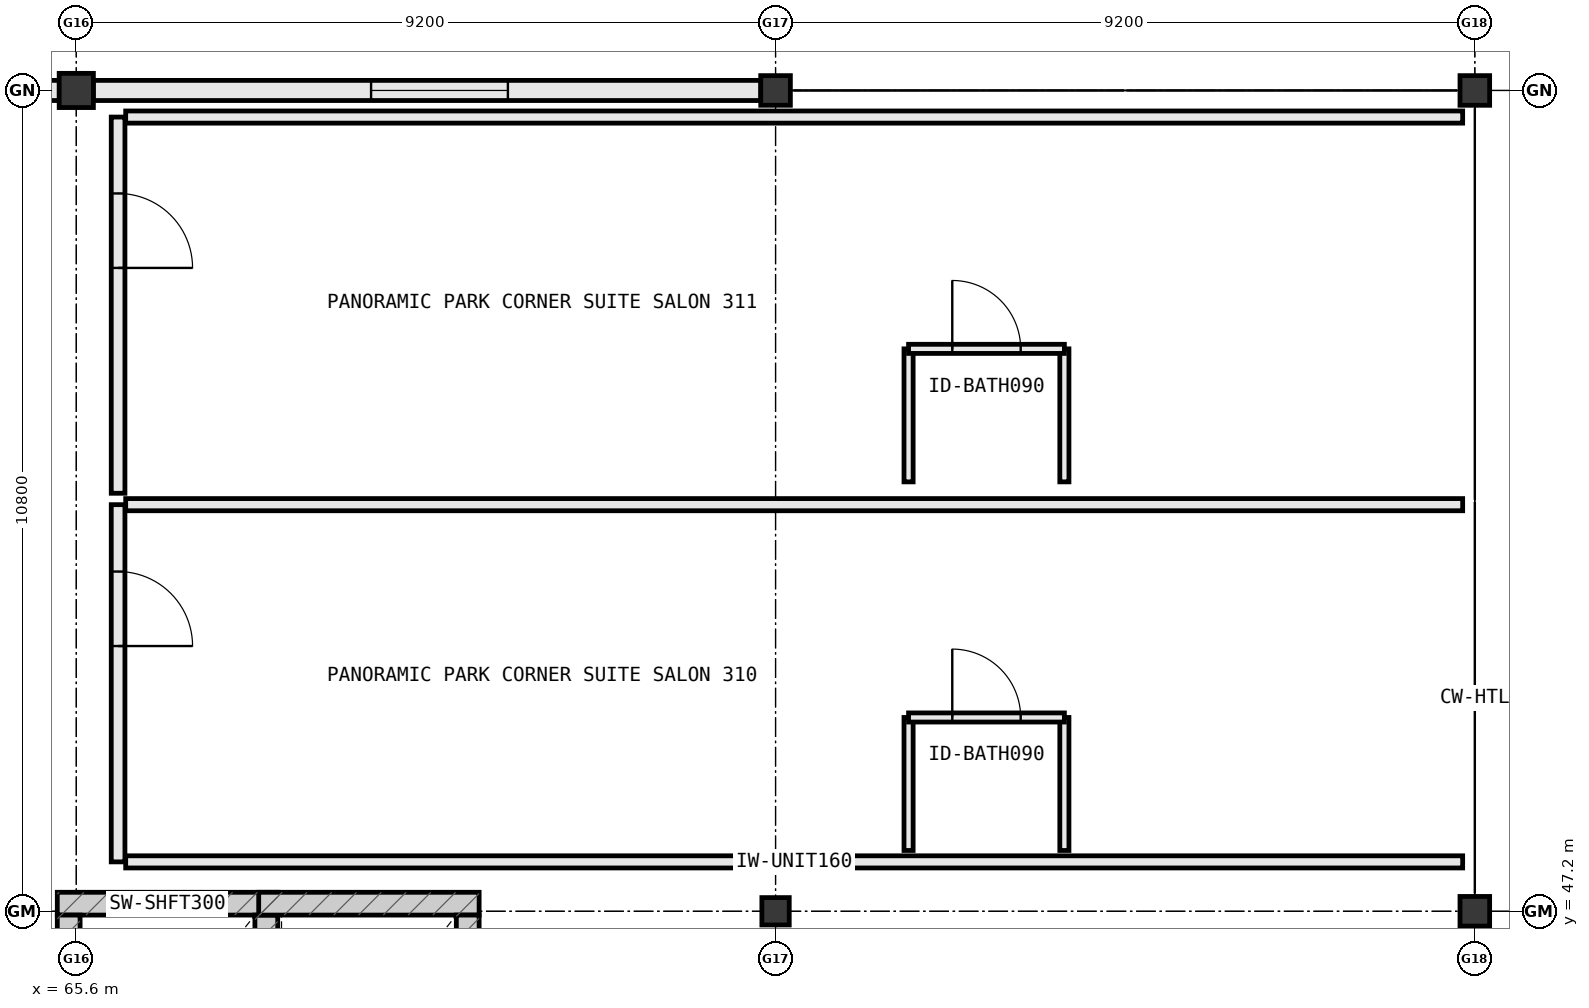
"""IFC4 building model, lengths in metres.
Left out: names, types, materials, properties, quantities, classifications, styles, units other than length and angle.
Written with IfcOpenShell. Run it as: python <this file> out.ifc"""

import sys

from ifc_helpers import new_model, si_unit, direction, frame, frame_2d, origin, origin_2d, place, context, subcontext, project, spatial, rectangle, extrude, element, fill, save


model = new_model("IFC4")
c1 = context("Model", 3, precision=1e-05, world=origin(), true_north=direction((0.0, 1.0)))
c2 = subcontext(c1, "Body", "Model", "MODEL_VIEW")
j1 = project(units=[si_unit("LENGTHUNIT", "METRE"), si_unit("PLANEANGLEUNIT", "RADIAN")], contexts=[c1])
p1 = place(None, origin())
s1 = spatial("IfcSite", under=j1, at=p1, CompositionType="ELEMENT")
p2 = place(p1, origin())
s2 = spatial("IfcBuilding", under=s1, at=p2, CompositionType="ELEMENT")
p3 = place(p2, frame((0.0, 0.0, 46.6)))
s3 = spatial("IfcBuildingStorey", under=s2, at=p3, CompositionType="ELEMENT", Elevation=46.6)
p4 = place(p3, frame((74.8, 47.2, 0.0), z_axis=(0.0, 0.0, 1.0), x_axis=(1.0, 0.0, 0.0)))
e1 = element("IfcColumn", 1, at=p4, inside=s3, PredefinedType="COLUMN", context=c2, shape_type="SweptSolid", body=[
    extrude(rectangle(XDim=0.36, YDim=0.36, at=origin_2d()), origin(), (0.0, 0.0, 1.0), 4.2),
])
for number, where, z_axis, x_axis in (
    (2, (74.8, 58.0, 0.0), (0.0, 0.0, 1.0), (1.0, 0.0, 0.0)),
    (3, (84.0, 47.2, 0.0), (0.0, 0.0, 1.0), (1.0, 0.0, 0.0)),
    (4, (84.0, 58.0, 0.0), (0.0, 0.0, 1.0), (1.0, 0.0, 0.0)),
):
    element("IfcColumn", number, at=place(p3, frame(where, z_axis=z_axis, x_axis=x_axis)), inside=s3, PredefinedType="COLUMN", context=c2, shape_type="SweptSolid", body=[
        extrude(rectangle(XDim=0.39, YDim=0.39, at=origin_2d()), origin(), (0.0, 0.0, 1.0), 4.2),
    ])
p5 = place(p3, frame((65.6, 58.0, 0.0), z_axis=(0.0, 0.0, 1.0), x_axis=(1.0, 0.0, 0.0)))
e5 = element("IfcColumn", 5, at=p5, inside=s3, PredefinedType="COLUMN", context=c2, shape_type="SweptSolid", body=[
    extrude(rectangle(XDim=0.45, YDim=0.45, at=origin_2d()), origin(), (0.0, 0.0, 1.0), 4.2),
])
p6 = place(p3, frame((84.0, 36.593, 0.0), z_axis=(0.0, 0.0, 1.0), x_axis=(0.0, 1.0, 0.0)))
e6 = element("IfcWall", 6, at=p6, inside=s3, PredefinedType="STANDARD", context=c2, shape_type="SweptSolid", body=[
    extrude(rectangle(XDim=10.414, YDim=0.265, at=frame_2d((5.207, 0.0))), origin(), (0.0, 0.0, 1.0), 3.99),
])
p7 = place(p6, frame((7.135, 0.0, 0.85)))
e7 = element("IfcOpeningElement", 7, at=p7, cuts=e6, PredefinedType="OPENING", context=c2, shape_type="SweptSolid", body=[
    extrude(rectangle(XDim=1.35, YDim=1.65, at=frame_2d((0.675, 0.825))), frame((0.0, 0.145, 0.0), z_axis=(0.0, -1.0, 0.0), x_axis=(1.0, 0.0, 0.0)), (0.0, 0.0, 1.0), 0.289),
])
p8 = place(p3, frame((74.607, 58.0, 0.0), z_axis=(0.0, 0.0, 1.0), x_axis=(-1.0, 0.0, 0.0)))
e8 = element("IfcWall", 8, at=p8, inside=s3, PredefinedType="STANDARD", context=c2, shape_type="SweptSolid", body=[
    extrude(rectangle(XDim=8.784, YDim=0.265, at=frame_2d((4.392, 0.0))), origin(), (0.0, 0.0, 1.0), 3.99),
])
p9 = place(p8, frame((3.329, 0.0, 0.85)))
e9 = element("IfcOpeningElement", 9, at=p9, cuts=e8, PredefinedType="OPENING", context=c2, shape_type="SweptSolid", body=[
    extrude(rectangle(XDim=1.8, YDim=1.85, at=frame_2d((0.9, 0.925))), frame((0.0, 0.145, 0.0), z_axis=(0.0, -1.0, 0.0), x_axis=(1.0, 0.0, 0.0)), (0.0, 0.0, 1.0), 0.289),
])
p10 = place(p3, frame((65.377, 58.0, 0.0), z_axis=(0.0, 0.0, 1.0), x_axis=(-1.0, 0.0, 0.0)))
e10 = element("IfcWall", 10, at=p10, inside=s3, PredefinedType="STANDARD", context=c2, shape_type="SweptSolid", body=[
    extrude(rectangle(XDim=4.384, YDim=0.265, at=frame_2d((2.192, 0.0))), origin(), (0.0, 0.0, 1.0), 3.99),
])
for number, where, z_axis, x_axis in (
    (11, (68.25, 47.3, 0.0), (0.0, 0.0, 1.0), (-1.0, 0.0, 0.0)),
    (12, (68.1, 44.25, 0.0), (0.0, 0.0, 1.0), (0.0, 1.0, 0.0)),
    (13, (65.5, 47.15, 0.0), (0.0, 0.0, 1.0), (0.0, -1.0, 0.0)),
    (14, (70.9, 47.3, 0.0), (0.0, 0.0, 1.0), (-1.0, 0.0, 0.0)),
    (15, (70.75, 44.25, 0.0), (0.0, 0.0, 1.0), (0.0, 1.0, 0.0)),
):
    element("IfcWall", number, at=place(p3, frame(where, z_axis=z_axis, x_axis=x_axis)), inside=s3, PredefinedType="SHEAR", context=c2, shape_type="SweptSolid", body=[
        extrude(rectangle(XDim=2.9, YDim=0.3, at=frame_2d((1.45, 0.0))), origin(), (0.0, 0.0, 1.0), 3.99),
    ])
p11 = place(p3, frame((66.15, 52.55, 0.0), z_axis=(0.0, 0.0, 1.0), x_axis=(0.0, -1.0, 0.0)))
e16 = element("IfcWall", 16, at=p11, inside=s3, PredefinedType="PARTITIONING", context=c2, shape_type="SweptSolid", body=[
    extrude(rectangle(XDim=4.7, YDim=0.18, at=frame_2d((2.35, 0.0))), origin(), (0.0, 0.0, 1.0), 3.99),
])
p12 = place(p11, frame((0.88, 0.0, 0.0)))
e17 = element("IfcOpeningElement", 17, at=p12, cuts=e16, PredefinedType="OPENING", context=c2, shape_type="SweptSolid", body=[
    extrude(rectangle(XDim=0.98, YDim=2.18, at=frame_2d((0.49, 1.09))), frame((0.0, 0.102, 0.0), z_axis=(0.0, -1.0, 0.0), x_axis=(1.0, 0.0, 0.0)), (0.0, 0.0, 1.0), 0.204),
])
for number, where, z_axis, x_axis in (
    (18, (66.25, 47.85, 0.0), (0.0, 0.0, 1.0), (1.0, 0.0, 0.0)),
    (19, (66.25, 52.55, 0.0), (0.0, 0.0, 1.0), (1.0, 0.0, 0.0)),
):
    element("IfcWall", number, at=place(p3, frame(where, z_axis=z_axis, x_axis=x_axis)), inside=s3, PredefinedType="PARTITIONING", context=c2, shape_type="SweptSolid", body=[
        extrude(rectangle(XDim=17.59, YDim=0.16, at=frame_2d((8.795, 0.0))), origin(), (0.0, 0.0, 1.0), 3.99),
    ])
for number, where, z_axis, x_axis in (
    (20, (76.55, 48.0, 0.0), (0.0, 0.0, 1.0), (0.0, 1.0, 0.0)),
    (21, (78.6, 48.0, 0.0), (0.0, 0.0, 1.0), (0.0, 1.0, 0.0)),
):
    element("IfcWall", number, at=place(p3, frame(where, z_axis=z_axis, x_axis=x_axis)), inside=s3, PredefinedType="PARTITIONING", context=c2, shape_type="SweptSolid", body=[
        extrude(rectangle(XDim=1.75, YDim=0.12, at=frame_2d((0.875, 0.0))), origin(), (0.0, 0.0, 1.0), 3.99),
    ])
p13 = place(p3, frame((76.55, 49.75, 0.0), z_axis=(0.0, 0.0, 1.0), x_axis=(1.0, 0.0, 0.0)))
e22 = element("IfcWall", 22, at=p13, inside=s3, PredefinedType="PARTITIONING", context=c2, shape_type="SweptSolid", body=[
    extrude(rectangle(XDim=2.05, YDim=0.12, at=frame_2d((1.025, 0.0))), origin(), (0.0, 0.0, 1.0), 3.99),
])
p14 = place(p13, frame((0.575, 0.0, 0.0)))
e23 = element("IfcOpeningElement", 23, at=p14, cuts=e22, PredefinedType="OPENING", context=c2, shape_type="SweptSolid", body=[
    extrude(rectangle(XDim=0.9, YDim=2.15, at=frame_2d((0.45, 1.075))), frame((0.0, 0.072, 0.0), z_axis=(0.0, -1.0, 0.0), x_axis=(1.0, 0.0, 0.0)), (0.0, 0.0, 1.0), 0.144),
])
p15 = place(p3, frame((66.15, 57.65, 0.0), z_axis=(0.0, 0.0, 1.0), x_axis=(0.0, -1.0, 0.0)))
e24 = element("IfcWall", 24, at=p15, inside=s3, PredefinedType="PARTITIONING", context=c2, shape_type="SweptSolid", body=[
    extrude(rectangle(XDim=4.95, YDim=0.18, at=frame_2d((2.475, 0.0))), origin(), (0.0, 0.0, 1.0), 3.99),
])
p16 = place(p15, frame((1.005, 0.0, 0.0)))
e25 = element("IfcOpeningElement", 25, at=p16, cuts=e24, PredefinedType="OPENING", context=c2, shape_type="SweptSolid", body=[
    extrude(rectangle(XDim=0.98, YDim=2.18, at=frame_2d((0.49, 1.09))), frame((0.0, 0.102, 0.0), z_axis=(0.0, -1.0, 0.0), x_axis=(1.0, 0.0, 0.0)), (0.0, 0.0, 1.0), 0.204),
])
p17 = place(p3, frame((66.25, 57.65, 0.0), z_axis=(0.0, 0.0, 1.0), x_axis=(1.0, 0.0, 0.0)))
e26 = element("IfcWall", 26, at=p17, inside=s3, PredefinedType="PARTITIONING", context=c2, shape_type="SweptSolid", body=[
    extrude(rectangle(XDim=17.59, YDim=0.16, at=frame_2d((8.795, 0.0))), origin(), (0.0, 0.0, 1.0), 3.99),
])
for number, where, z_axis, x_axis in (
    (27, (76.55, 52.85, 0.0), (0.0, 0.0, 1.0), (0.0, 1.0, 0.0)),
    (28, (78.6, 52.85, 0.0), (0.0, 0.0, 1.0), (0.0, 1.0, 0.0)),
):
    element("IfcWall", number, at=place(p3, frame(where, z_axis=z_axis, x_axis=x_axis)), inside=s3, PredefinedType="PARTITIONING", context=c2, shape_type="SweptSolid", body=[
        extrude(rectangle(XDim=1.75, YDim=0.12, at=frame_2d((0.875, 0.0))), origin(), (0.0, 0.0, 1.0), 3.99),
    ])
p18 = place(p3, frame((76.55, 54.6, 0.0), z_axis=(0.0, 0.0, 1.0), x_axis=(1.0, 0.0, 0.0)))
e29 = element("IfcWall", 29, at=p18, inside=s3, PredefinedType="PARTITIONING", context=c2, shape_type="SweptSolid", body=[
    extrude(rectangle(XDim=2.05, YDim=0.12, at=frame_2d((1.025, 0.0))), origin(), (0.0, 0.0, 1.0), 3.99),
])
p19 = place(p18, frame((0.575, 0.0, 0.0)))
e30 = element("IfcOpeningElement", 30, at=p19, cuts=e29, PredefinedType="OPENING", context=c2, shape_type="SweptSolid", body=[
    extrude(rectangle(XDim=0.9, YDim=2.15, at=frame_2d((0.45, 1.075))), frame((0.0, 0.072, 0.0), z_axis=(0.0, -1.0, 0.0), x_axis=(1.0, 0.0, 0.0)), (0.0, 0.0, 1.0), 0.144),
])
p20 = place(p9, origin())
e31 = element("IfcWindow", 31, at=p20, inside=s3, PartitioningType="SINGLE_PANEL", PredefinedType="WINDOW", context=c2, shape_type="SweptSolid", body=[
    extrude(rectangle(XDim=1.8, YDim=1.85, at=frame_2d((0.9, 0.925))), frame((0.0, 0.03, 0.0), z_axis=(0.0, -1.0, 0.0), x_axis=(1.0, 0.0, 0.0)), (0.0, 0.0, 1.0), 0.06),
])
fill(e9, e31)
p21 = place(p12, origin())
e32 = element("IfcDoor", 32, at=p21, inside=s3, OperationType="SINGLE_SWING_RIGHT", PredefinedType="DOOR", context=c2, shape_type="SweptSolid", body=[
    extrude(rectangle(XDim=0.98, YDim=2.18, at=frame_2d((0.49, 1.09))), frame((0.0, 0.025, 0.0), z_axis=(0.0, -1.0, 0.0), x_axis=(1.0, 0.0, 0.0)), (0.0, 0.0, 1.0), 0.05),
])
fill(e17, e32)
p22 = place(p14, origin())
e33 = element("IfcDoor", 33, at=p22, inside=s3, OperationType="SINGLE_SWING_LEFT", PredefinedType="DOOR", context=c2, shape_type="SweptSolid", body=[
    extrude(rectangle(XDim=0.9, YDim=2.15, at=frame_2d((0.45, 1.075))), frame((0.0, 0.025, 0.0), z_axis=(0.0, -1.0, 0.0), x_axis=(1.0, 0.0, 0.0)), (0.0, 0.0, 1.0), 0.05),
])
fill(e23, e33)
p23 = place(p16, origin())
e34 = element("IfcDoor", 34, at=p23, inside=s3, OperationType="SINGLE_SWING_RIGHT", PredefinedType="DOOR", context=c2, shape_type="SweptSolid", body=[
    extrude(rectangle(XDim=0.98, YDim=2.18, at=frame_2d((0.49, 1.09))), frame((0.0, 0.025, 0.0), z_axis=(0.0, -1.0, 0.0), x_axis=(1.0, 0.0, 0.0)), (0.0, 0.0, 1.0), 0.05),
])
fill(e25, e34)
p24 = place(p19, origin())
e35 = element("IfcDoor", 35, at=p24, inside=s3, OperationType="SINGLE_SWING_LEFT", PredefinedType="DOOR", context=c2, shape_type="SweptSolid", body=[
    extrude(rectangle(XDim=0.9, YDim=2.15, at=frame_2d((0.45, 1.075))), frame((0.0, 0.025, 0.0), z_axis=(0.0, -1.0, 0.0), x_axis=(1.0, 0.0, 0.0)), (0.0, 0.0, 1.0), 0.05),
])
fill(e30, e35)
save(model, sys.argv[1])
